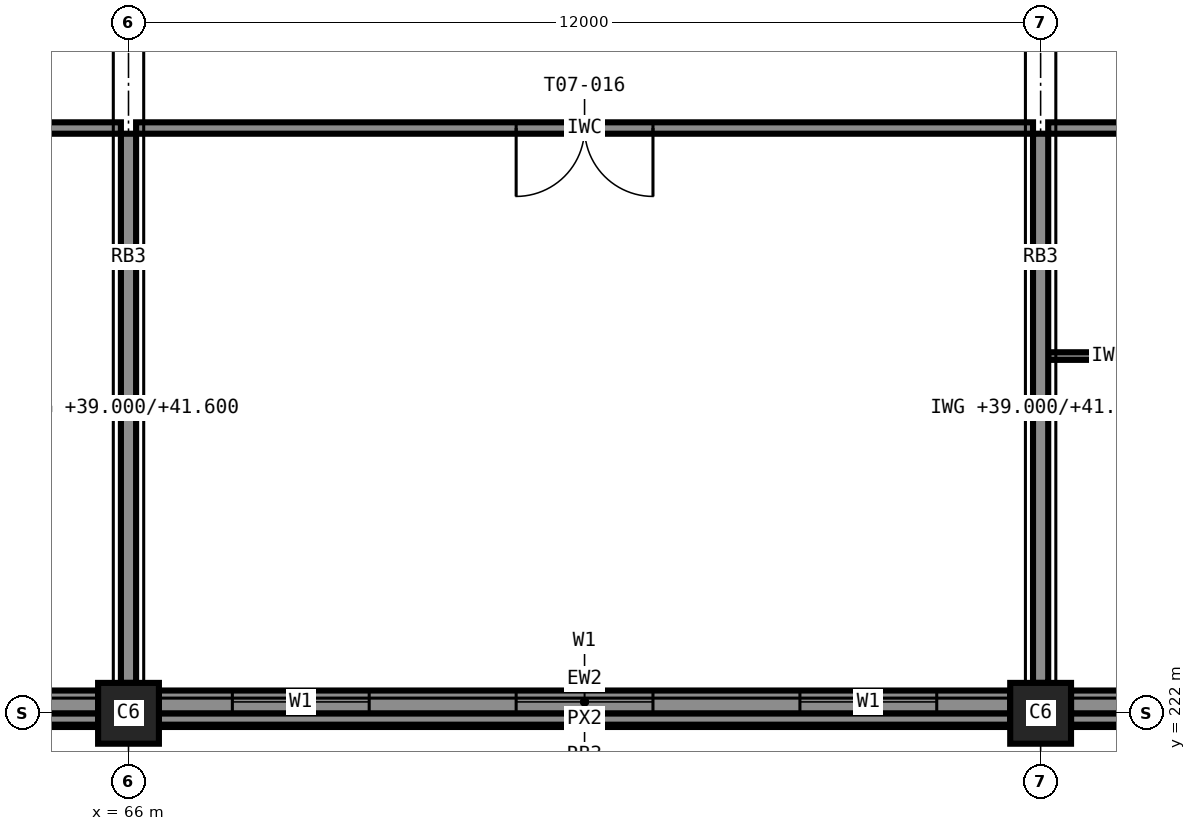
"""IFC4 building model, lengths in metres.
Left out: names, types, materials, properties, quantities, classifications, styles, units other than length and angle.
Written with IfcOpenShell. Run it as: python <this file> out.ifc"""

import sys

from ifc_helpers import new_model, si_unit, direction, frame, frame_2d, origin, origin_2d, place, context, subcontext, project, spatial, rectangle, extrude, element, fill, save


model = new_model("IFC4")
c1 = context("Model", 3, precision=1e-05, world=origin(), true_north=direction((0.0, 1.0)))
c2 = subcontext(c1, "Body", "Model", "MODEL_VIEW")
j1 = project(units=[si_unit("LENGTHUNIT", "METRE"), si_unit("PLANEANGLEUNIT", "RADIAN")], contexts=[c1])
p1 = place(None, origin())
s1 = spatial("IfcSite", under=j1, at=p1, CompositionType="ELEMENT")
p2 = place(p1, origin())
s2 = spatial("IfcBuilding", under=s1, at=p2, CompositionType="ELEMENT")
p3 = place(p2, frame((0.0, 0.0, 39.0)))
s3 = spatial("IfcBuildingStorey", under=s2, at=p3, CompositionType="ELEMENT", Elevation=39.0)
for number, where, z_axis, x_axis in (
    (1, (66.0, 222.0, 0.0), (0.0, 0.0, 1.0), (1.0, 0.0, 0.0)),
    (2, (78.0, 222.0, 0.0), (0.0, 0.0, 1.0), (1.0, 0.0, 0.0)),
):
    element("IfcColumn", number, at=place(p3, frame(where, z_axis=z_axis, x_axis=x_axis)), inside=s3, PredefinedType="COLUMN", context=c2, shape_type="SweptSolid", body=[
        extrude(rectangle(XDim=0.8, YDim=0.8, at=origin_2d()), origin(), (0.0, 0.0, 1.0), 3.6),
    ])
p4 = place(p3, frame((54.4, 222.15, 0.0), z_axis=(0.0, 0.0, 1.0), x_axis=(1.0, 0.0, 0.0)))
e3 = element("IfcWall", 3, at=p4, inside=s3, PredefinedType="STANDARD", context=c2, shape_type="SweptSolid", body=[
    extrude(rectangle(XDim=11.2, YDim=0.3, at=frame_2d((5.6, 0.0))), origin(), (0.0, 0.0, 1.0), 2.6),
])
p5 = place(p4, frame((1.9, 0.0, 0.85)))
e4 = element("IfcOpeningElement", 4, at=p5, cuts=e3, PredefinedType="OPENING", context=c2, shape_type="SweptSolid", body=[
    extrude(rectangle(XDim=1.8, YDim=1.75, at=frame_2d((0.9, 0.875))), frame((0.0, 0.16, 0.0), z_axis=(0.0, -1.0, 0.0), x_axis=(1.0, 0.0, 0.0)), (0.0, 0.0, 1.0), 0.32),
])
p6 = place(p4, frame((7.5, 0.0, 0.85)))
e5 = element("IfcOpeningElement", 5, at=p6, cuts=e3, PredefinedType="OPENING", context=c2, shape_type="SweptSolid", body=[
    extrude(rectangle(XDim=1.8, YDim=1.75, at=frame_2d((0.9, 0.875))), frame((0.0, 0.16, 0.0), z_axis=(0.0, -1.0, 0.0), x_axis=(1.0, 0.0, 0.0)), (0.0, 0.0, 1.0), 0.32),
])
p7 = place(p3, frame((66.4, 222.15, 0.0), z_axis=(0.0, 0.0, 1.0), x_axis=(1.0, 0.0, 0.0)))
e6 = element("IfcWall", 6, at=p7, inside=s3, PredefinedType="STANDARD", context=c2, shape_type="SweptSolid", body=[
    extrude(rectangle(XDim=11.2, YDim=0.3, at=frame_2d((5.6, 0.0))), origin(), (0.0, 0.0, 1.0), 2.6),
])
p8 = place(p7, frame((0.967, 0.0, 0.85)))
e7 = element("IfcOpeningElement", 7, at=p8, cuts=e6, PredefinedType="OPENING", context=c2, shape_type="SweptSolid", body=[
    extrude(rectangle(XDim=1.8, YDim=1.75, at=frame_2d((0.9, 0.875))), frame((0.0, 0.16, 0.0), z_axis=(0.0, -1.0, 0.0), x_axis=(1.0, 0.0, 0.0)), (0.0, 0.0, 1.0), 0.32),
])
p9 = place(p7, frame((4.7, 0.0, 0.85)))
e8 = element("IfcOpeningElement", 8, at=p9, cuts=e6, PredefinedType="OPENING", context=c2, shape_type="SweptSolid", body=[
    extrude(rectangle(XDim=1.8, YDim=1.75, at=frame_2d((0.9, 0.875))), frame((0.0, 0.16, 0.0), z_axis=(0.0, -1.0, 0.0), x_axis=(1.0, 0.0, 0.0)), (0.0, 0.0, 1.0), 0.32),
])
p10 = place(p7, frame((8.433, 0.0, 0.85)))
e9 = element("IfcOpeningElement", 9, at=p10, cuts=e6, PredefinedType="OPENING", context=c2, shape_type="SweptSolid", body=[
    extrude(rectangle(XDim=1.8, YDim=1.75, at=frame_2d((0.9, 0.875))), frame((0.0, 0.16, 0.0), z_axis=(0.0, -1.0, 0.0), x_axis=(1.0, 0.0, 0.0)), (0.0, 0.0, 1.0), 0.32),
])
p11 = place(p3, frame((78.4, 222.15, 0.0), z_axis=(0.0, 0.0, 1.0), x_axis=(1.0, 0.0, 0.0)))
e10 = element("IfcWall", 10, at=p11, inside=s3, PredefinedType="STANDARD", context=c2, shape_type="SweptSolid", body=[
    extrude(rectangle(XDim=11.2, YDim=0.3, at=frame_2d((5.6, 0.0))), origin(), (0.0, 0.0, 1.0), 2.6),
])
p12 = place(p11, frame((0.9, 0.0, 0.85)))
e11 = element("IfcOpeningElement", 11, at=p12, cuts=e10, PredefinedType="OPENING", context=c2, shape_type="SweptSolid", body=[
    extrude(rectangle(XDim=1.8, YDim=1.75, at=frame_2d((0.9, 0.875))), frame((0.0, 0.16, 0.0), z_axis=(0.0, -1.0, 0.0), x_axis=(1.0, 0.0, 0.0)), (0.0, 0.0, 1.0), 0.32),
])
p13 = place(p11, frame((4.7, 0.0, 0.85)))
e12 = element("IfcOpeningElement", 12, at=p13, cuts=e10, PredefinedType="OPENING", context=c2, shape_type="SweptSolid", body=[
    extrude(rectangle(XDim=1.8, YDim=1.75, at=frame_2d((0.9, 0.875))), frame((0.0, 0.16, 0.0), z_axis=(0.0, -1.0, 0.0), x_axis=(1.0, 0.0, 0.0)), (0.0, 0.0, 1.0), 0.32),
])
for number, where, z_axis, x_axis in (
    (13, (54.4, 221.925, 3.4), (0.0, 0.0, 1.0), (1.0, 0.0, 0.0)),
    (14, (66.4, 221.925, 3.4), (0.0, 0.0, 1.0), (1.0, 0.0, 0.0)),
    (15, (78.4, 221.925, 3.4), (0.0, 0.0, 1.0), (1.0, 0.0, 0.0)),
):
    element("IfcWall", number, at=place(p3, frame(where, z_axis=z_axis, x_axis=x_axis)), inside=s3, PredefinedType="STANDARD", context=c2, shape_type="SweptSolid", body=[
        extrude(rectangle(XDim=11.2, YDim=0.15, at=frame_2d((5.6, 0.0))), origin(), (0.0, 0.0, 1.0), 0.2),
    ])
p14 = place(p3, frame((65.9, 229.7, 0.0), z_axis=(0.0, 0.0, 1.0), x_axis=(-1.0, 0.0, 0.0)))
e16 = element("IfcWall", 16, at=p14, inside=s3, PredefinedType="PARTITIONING", context=c2, shape_type="SweptSolid", body=[
    extrude(rectangle(XDim=5.8, YDim=0.15, at=frame_2d((2.9, 0.0))), origin(), (0.0, 0.0, 1.0), 3.4),
])
p15 = place(p14, frame((1.2, 0.0, 0.0)))
e17 = element("IfcOpeningElement", 17, at=p15, cuts=e16, PredefinedType="OPENING", context=c2, shape_type="SweptSolid", body=[
    extrude(rectangle(XDim=1.0, YDim=2.1, at=frame_2d((0.5, 1.05))), frame((0.0, 0.085, 0.0), z_axis=(0.0, -1.0, 0.0), x_axis=(1.0, 0.0, 0.0)), (0.0, 0.0, 1.0), 0.17),
])
p16 = place(p3, frame((77.9, 229.7, 0.0), z_axis=(0.0, 0.0, 1.0), x_axis=(-1.0, 0.0, 0.0)))
e18 = element("IfcWall", 18, at=p16, inside=s3, PredefinedType="PARTITIONING", context=c2, shape_type="SweptSolid", body=[
    extrude(rectangle(XDim=11.8, YDim=0.15, at=frame_2d((5.9, 0.0))), origin(), (0.0, 0.0, 1.0), 3.4),
])
p17 = place(p16, frame((5.0, 0.0, 0.0)))
e19 = element("IfcOpeningElement", 19, at=p17, cuts=e18, PredefinedType="OPENING", context=c2, shape_type="SweptSolid", body=[
    extrude(rectangle(XDim=1.8, YDim=2.1, at=frame_2d((0.9, 1.05))), frame((0.0, 0.085, 0.0), z_axis=(0.0, -1.0, 0.0), x_axis=(1.0, 0.0, 0.0)), (0.0, 0.0, 1.0), 0.17),
])
p18 = place(p3, frame((81.9, 229.7, 0.0), z_axis=(0.0, 0.0, 1.0), x_axis=(-1.0, 0.0, 0.0)))
e20 = element("IfcWall", 20, at=p18, inside=s3, PredefinedType="PARTITIONING", context=c2, shape_type="SweptSolid", body=[
    extrude(rectangle(XDim=3.8, YDim=0.15, at=frame_2d((1.9, 0.0))), origin(), (0.0, 0.0, 1.0), 3.4),
])
p19 = place(p18, frame((0.55, 0.0, 0.0)))
e21 = element("IfcOpeningElement", 21, at=p19, cuts=e20, PredefinedType="OPENING", context=c2, shape_type="SweptSolid", body=[
    extrude(rectangle(XDim=1.0, YDim=2.1, at=frame_2d((0.5, 1.05))), frame((0.0, 0.085, 0.0), z_axis=(0.0, -1.0, 0.0), x_axis=(1.0, 0.0, 0.0)), (0.0, 0.0, 1.0), 0.17),
])
p20 = place(p3, frame((78.1, 226.7, 0.0), z_axis=(0.0, 0.0, 1.0), x_axis=(1.0, 0.0, 0.0)))
e22 = element("IfcWall", 22, at=p20, inside=s3, PredefinedType="PARTITIONING", context=c2, shape_type="SweptSolid", body=[
    extrude(rectangle(XDim=1.6, YDim=0.1, at=frame_2d((0.8, 0.0))), origin(), (0.0, 0.0, 1.0), 3.4),
])
for number, where, z_axis, x_axis in (
    (23, (66.0, 222.4, 0.0), (0.0, 0.0, 1.0), (0.0, 1.0, 0.0)),
    (24, (78.0, 222.4, 0.0), (0.0, 0.0, 1.0), (0.0, 1.0, 0.0)),
):
    element("IfcWall", number, at=place(p3, frame(where, z_axis=z_axis, x_axis=x_axis)), inside=s3, PredefinedType="PARTITIONING", context=c2, shape_type="SweptSolid", body=[
        extrude(rectangle(XDim=7.225, YDim=0.2, at=frame_2d((3.613, 0.0))), origin(), (0.0, 0.0, 1.0), 2.6),
    ])
p21 = place(p8, origin())
e25 = element("IfcWindow", 25, at=p21, inside=s3, PartitioningType="SINGLE_PANEL", PredefinedType="WINDOW", context=c2, shape_type="SweptSolid", body=[
    extrude(rectangle(XDim=1.8, YDim=1.75, at=frame_2d((0.9, 0.875))), frame((0.0, 0.03, 0.0), z_axis=(0.0, -1.0, 0.0), x_axis=(1.0, 0.0, 0.0)), (0.0, 0.0, 1.0), 0.06),
])
fill(e7, e25)
p22 = place(p9, origin())
e26 = element("IfcWindow", 26, at=p22, inside=s3, PartitioningType="SINGLE_PANEL", PredefinedType="WINDOW", context=c2, shape_type="SweptSolid", body=[
    extrude(rectangle(XDim=1.8, YDim=1.75, at=frame_2d((0.9, 0.875))), frame((0.0, 0.03, 0.0), z_axis=(0.0, -1.0, 0.0), x_axis=(1.0, 0.0, 0.0)), (0.0, 0.0, 1.0), 0.06),
])
fill(e8, e26)
p23 = place(p10, origin())
e27 = element("IfcWindow", 27, at=p23, inside=s3, PartitioningType="SINGLE_PANEL", PredefinedType="WINDOW", context=c2, shape_type="SweptSolid", body=[
    extrude(rectangle(XDim=1.8, YDim=1.75, at=frame_2d((0.9, 0.875))), frame((0.0, 0.03, 0.0), z_axis=(0.0, -1.0, 0.0), x_axis=(1.0, 0.0, 0.0)), (0.0, 0.0, 1.0), 0.06),
])
fill(e9, e27)
p24 = place(p17, origin())
e28 = element("IfcDoor", 28, at=p24, inside=s3, OperationType="DOUBLE_DOOR_SINGLE_SWING", PredefinedType="DOOR", context=c2, shape_type="SweptSolid", body=[
    extrude(rectangle(XDim=1.8, YDim=2.1, at=frame_2d((0.9, 1.05))), frame((0.0, 0.025, 0.0), z_axis=(0.0, -1.0, 0.0), x_axis=(1.0, 0.0, 0.0)), (0.0, 0.0, 1.0), 0.05),
])
fill(e19, e28)
save(model, sys.argv[1])
